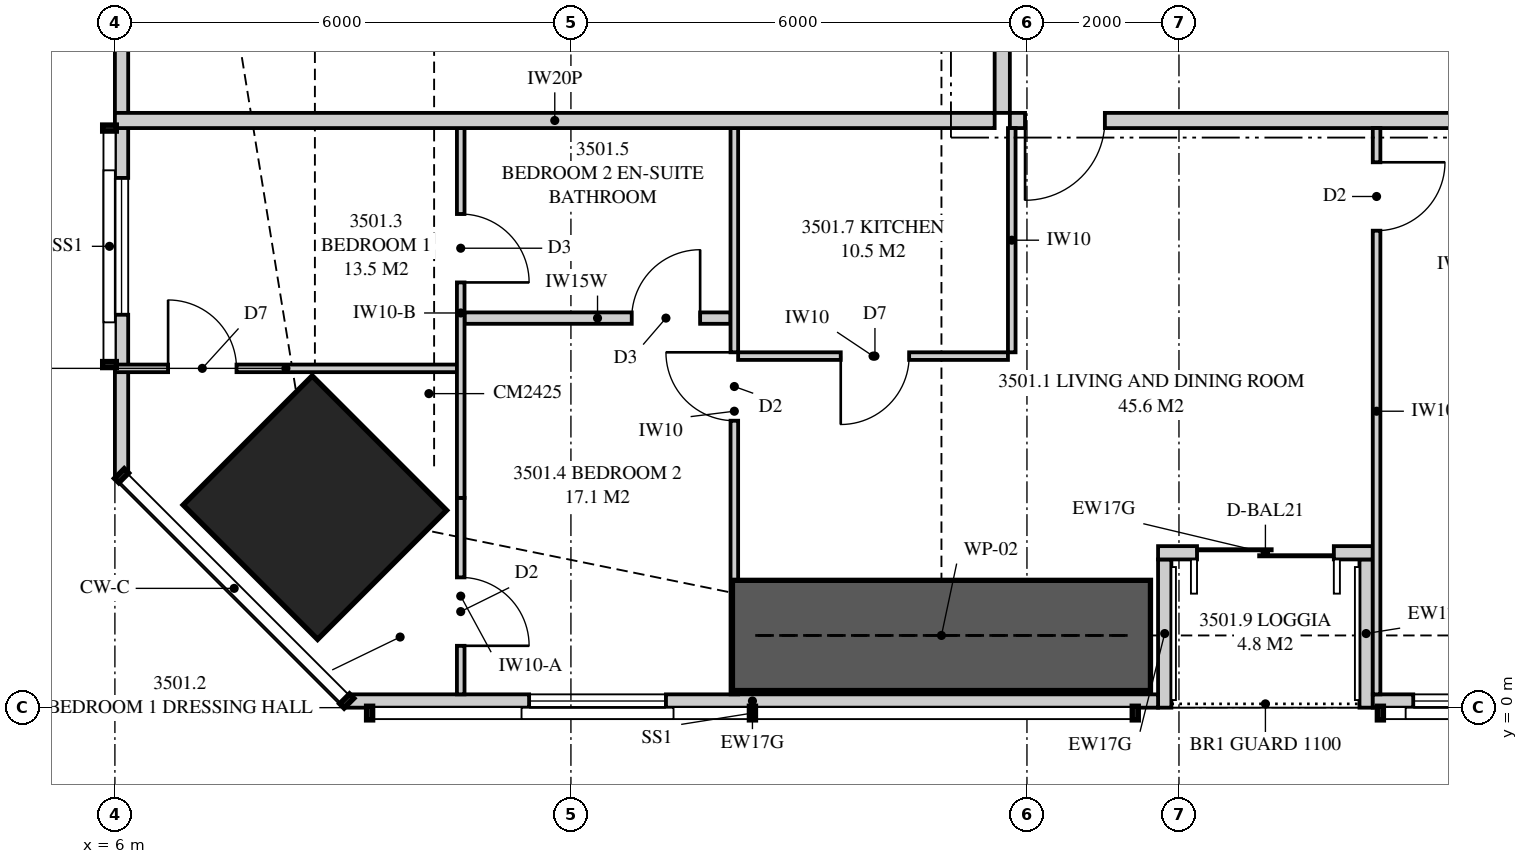
"""IFC4 building model, lengths in metres.
Left out: names, types, materials, properties, quantities, classifications, styles, units other than length and angle.
Written with IfcOpenShell. Run it as: python <this file> out.ifc"""

import sys

from ifc_helpers import new_model, si_unit, direction, frame, frame_2d, origin, origin_2d, place, context, subcontext, project, spatial, polyline, rectangle, outline, extrude, element, fill, save


model = new_model("IFC4")
c1 = context("Model", 3, precision=1e-05, world=origin(), true_north=direction((0.0, 1.0)))
c2 = subcontext(c1, "Body", "Model", "MODEL_VIEW")
j1 = project(units=[si_unit("LENGTHUNIT", "METRE"), si_unit("PLANEANGLEUNIT", "RADIAN")], contexts=[c1])
p1 = place(None, origin())
s1 = spatial("IfcSite", under=j1, at=p1, CompositionType="ELEMENT")
p2 = place(p1, origin())
s2 = spatial("IfcBuilding", under=s1, at=p2, CompositionType="ELEMENT")
p3 = place(p2, frame((0.0, 0.0, 128.3)))
s3 = spatial("IfcBuildingStorey", under=s2, at=p3, CompositionType="ELEMENT", Elevation=128.3)
p4 = place(p3, frame((8.631, 2.631, 0.0), z_axis=(0.0, 0.0, 1.0), x_axis=(0.707106781187, 0.707106781187, 0.0)))
e1 = element("IfcColumn", 1, at=p4, inside=s3, PredefinedType="COLUMN", context=c2, shape_type="SweptSolid", body=[
    extrude(rectangle(XDim=2.4, YDim=2.5, at=origin_2d()), origin(), (0.0, 0.0, 1.0), 3.35),
])
p5 = place(p3, frame((9.051, 0.087, 0.0), z_axis=(0.0, 0.0, 1.0), x_axis=(1.0, 0.0, 0.0)))
e2 = element("IfcWall", 2, at=p5, inside=s3, PredefinedType="SOLIDWALL", context=c2, shape_type="SweptSolid", body=[
    extrude(outline(polyline([(0.0, 0.0), (10.674, 0.0), (10.674, 2.15), (7.824, 2.15), (7.824, 3.11), (7.666, 3.11), (7.666, 2.15), (7.62, 2.15), (7.62, 3.11), (0.0, 3.11), (0.0, 0.0)])), frame((0.0, 0.087, 0.0), z_axis=(0.0, -1.0, 0.0), x_axis=(1.0, 0.0, 0.0)), (0.0, 0.0, 1.0), 0.175),
])
p6 = place(p5, frame((2.399, 0.0, 0.4)))
e3 = element("IfcOpeningElement", 3, at=p6, cuts=e2, PredefinedType="OPENING", context=c2, shape_type="SweptSolid", body=[
    extrude(rectangle(XDim=1.8, YDim=1.7, at=frame_2d((0.9, 0.85))), frame((0.0, 0.097, 0.0), z_axis=(0.0, -1.0, 0.0), x_axis=(1.0, 0.0, 0.0)), (0.0, 0.0, 1.0), 0.195),
])
p7 = place(p3, frame((22.55, 0.087, 0.0), z_axis=(0.0, 0.0, 1.0), x_axis=(1.0, 0.0, 0.0)))
e4 = element("IfcWall", 4, at=p7, inside=s3, PredefinedType="SOLIDWALL", context=c2, shape_type="SweptSolid", body=[
    extrude(rectangle(XDim=10.4, YDim=0.175, at=frame_2d((5.2, 0.0))), origin(), (0.0, 0.0, 1.0), 2.15),
])
p8 = place(p7, frame((0.532, 0.0, 0.4)))
e5 = element("IfcOpeningElement", 5, at=p8, cuts=e4, PredefinedType="OPENING", context=c2, shape_type="SweptSolid", body=[
    extrude(rectangle(XDim=1.8, YDim=1.7, at=frame_2d((0.9, 0.85))), frame((0.0, 0.097, 0.0), z_axis=(0.0, -1.0, 0.0), x_axis=(1.0, 0.0, 0.0)), (0.0, 0.0, 1.0), 0.195),
])
p9 = place(p7, frame((8.065, 0.0, 0.4)))
e6 = element("IfcOpeningElement", 6, at=p9, cuts=e4, PredefinedType="OPENING", context=c2, shape_type="SweptSolid", body=[
    extrude(rectangle(XDim=1.8, YDim=1.7, at=frame_2d((0.9, 0.85))), frame((0.0, 0.097, 0.0), z_axis=(0.0, -1.0, 0.0), x_axis=(1.0, 0.0, 0.0)), (0.0, 0.0, 1.0), 0.195),
])
p10 = place(p3, frame((19.725, 2.038, 0.0), z_axis=(0.0, 0.0, 1.0), x_axis=(1.0, 0.0, 0.0)))
e7 = element("IfcWall", 7, at=p10, inside=s3, PredefinedType="SOLIDWALL", context=c2, shape_type="SweptSolid", body=[
    extrude(rectangle(XDim=2.825, YDim=0.175, at=frame_2d((1.413, 0.0))), origin(), (0.0, 0.0, 1.0), 3.11),
])
p11 = place(p10, frame((0.512, 0.0, 0.0)))
e8 = element("IfcOpeningElement", 8, at=p11, cuts=e7, PredefinedType="OPENING", context=c2, shape_type="SweptSolid", body=[
    extrude(rectangle(XDim=1.8, YDim=2.1, at=frame_2d((0.9, 1.05))), frame((0.0, 0.097, 0.0), z_axis=(0.0, -1.0, 0.0), x_axis=(1.0, 0.0, 0.0)), (0.0, 0.0, 1.0), 0.195),
])
for number, where, z_axis, x_axis in (
    (9, (19.812, 0.0, 0.0), (0.0, 0.0, 1.0), (0.0, 1.0, 0.0)),
    (10, (22.462, 0.0, 0.0), (0.0, 0.0, 1.0), (0.0, 1.0, 0.0)),
):
    element("IfcWall", number, at=place(p3, frame(where, z_axis=z_axis, x_axis=x_axis)), inside=s3, PredefinedType="SOLIDWALL", context=c2, shape_type="SweptSolid", body=[
        extrude(outline(polyline([(0.0, 0.0), (1.95, 0.0), (1.95, 3.11), (1.75, 3.11), (1.75, 2.15), (0.15, 2.15), (0.15, 3.11), (0.0, 3.11), (0.0, 0.0)])), frame((0.0, 0.087, 0.0), z_axis=(0.0, -1.0, 0.0), x_axis=(1.0, 0.0, 0.0)), (0.0, 0.0, 1.0), 0.175),
    ])
p12 = place(p3, frame((6.087, 18.8, 0.0), z_axis=(0.0, 0.0, 1.0), x_axis=(0.0, -1.0, 0.0)))
e11 = element("IfcWall", 11, at=p12, inside=s3, PredefinedType="SOLIDWALL", context=c2, shape_type="SweptSolid", body=[
    extrude(outline(polyline([(0.0, 0.0), (15.749, 0.0), (15.749, 3.11), (6.019, 3.11), (6.019, 2.15), (5.926, 2.15), (5.926, 3.11), (5.8, 3.11), (5.8, 2.15), (0.0, 2.15), (0.0, 0.0)])), frame((0.0, 0.087, 0.0), z_axis=(0.0, -1.0, 0.0), x_axis=(1.0, 0.0, 0.0)), (0.0, 0.0, 1.0), 0.175),
])
p13 = place(p12, frame((0.95, 0.0, 0.4)))
e12 = element("IfcOpeningElement", 12, at=p13, cuts=e11, PredefinedType="OPENING", context=c2, shape_type="SweptSolid", body=[
    extrude(rectangle(XDim=1.8, YDim=1.7, at=frame_2d((0.9, 0.85))), frame((0.0, 0.097, 0.0), z_axis=(0.0, -1.0, 0.0), x_axis=(1.0, 0.0, 0.0)), (0.0, 0.0, 1.0), 0.195),
])
p14 = place(p12, frame((8.76, 0.0, 0.4)))
e13 = element("IfcOpeningElement", 13, at=p14, cuts=e11, PredefinedType="OPENING", context=c2, shape_type="SweptSolid", body=[
    extrude(rectangle(XDim=1.2, YDim=1.7, at=frame_2d((0.6, 0.85))), frame((0.0, 0.097, 0.0), z_axis=(0.0, -1.0, 0.0), x_axis=(1.0, 0.0, 0.0)), (0.0, 0.0, 1.0), 0.195),
])
p15 = place(p12, frame((11.831, 0.0, 0.4)))
e14 = element("IfcOpeningElement", 14, at=p15, cuts=e11, PredefinedType="OPENING", context=c2, shape_type="SweptSolid", body=[
    extrude(rectangle(XDim=1.8, YDim=1.7, at=frame_2d((0.9, 0.85))), frame((0.0, 0.097, 0.0), z_axis=(0.0, -1.0, 0.0), x_axis=(1.0, 0.0, 0.0)), (0.0, 0.0, 1.0), 0.195),
])
p16 = place(p3, frame((17.775, 7.725, 0.0), z_axis=(0.0, 0.0, 1.0), x_axis=(1.0, 0.0, 0.0)))
e15 = element("IfcWall", 15, at=p16, inside=s3, PredefinedType="PARTITIONING", context=c2, shape_type="SweptSolid", body=[
    extrude(rectangle(XDim=9.025, YDim=0.2, at=frame_2d((4.513, 0.0))), origin(), (0.0, 0.0, 1.0), 3.11),
])
p17 = place(p16, frame((0.2, 0.0, 0.0)))
e16 = element("IfcOpeningElement", 16, at=p17, cuts=e15, PredefinedType="OPENING", context=c2, shape_type="SweptSolid", body=[
    extrude(rectangle(XDim=1.05, YDim=2.2, at=frame_2d((0.525, 1.1))), frame((0.0, 0.11, 0.0), z_axis=(0.0, -1.0, 0.0), x_axis=(1.0, 0.0, 0.0)), (0.0, 0.0, 1.0), 0.22),
])
p18 = place(p3, frame((10.55, 0.175, 0.0), z_axis=(0.0, 0.0, 1.0), x_axis=(0.0, 1.0, 0.0)))
e17 = element("IfcWall", 17, at=p18, inside=s3, PredefinedType="PARTITIONING", context=c2, shape_type="SweptSolid", body=[
    extrude(outline(polyline([(0.0, 0.0), (2.585, 0.0), (2.585, 2.15), (1.188, 2.15), (1.188, 3.11), (0.0, 3.11), (0.0, 0.0)])), frame((0.0, 0.05, 0.0), z_axis=(0.0, -1.0, 0.0), x_axis=(1.0, 0.0, 0.0)), (0.0, 0.0, 1.0), 0.1),
])
p19 = place(p18, frame((0.639, 0.0, 0.0)))
e18 = element("IfcOpeningElement", 18, at=p19, cuts=e17, PredefinedType="OPENING", context=c2, shape_type="SweptSolid", body=[
    extrude(rectangle(XDim=0.9, YDim=2.1, at=frame_2d((0.45, 1.05))), frame((0.0, 0.06, 0.0), z_axis=(0.0, -1.0, 0.0), x_axis=(1.0, 0.0, 0.0)), (0.0, 0.0, 1.0), 0.12),
])
p20 = place(p3, frame((10.55, 2.76, 0.0), z_axis=(0.0, 0.0, 1.0), x_axis=(0.0, 1.0, 0.0)))
e19 = element("IfcWall", 19, at=p20, inside=s3, PredefinedType="PARTITIONING", context=c2, shape_type="SweptSolid", body=[
    extrude(outline(polyline([(0.0, 0.0), (4.865, 0.0), (4.865, 2.51), (0.358, 2.51), (0.358, 2.15), (0.0, 2.15), (0.0, 0.0)])), frame((0.0, 0.05, 0.0), z_axis=(0.0, -1.0, 0.0), x_axis=(1.0, 0.0, 0.0)), (0.0, 0.0, 1.0), 0.1),
])
p21 = place(p20, frame((2.834, 0.0, 0.0)))
e20 = element("IfcOpeningElement", 20, at=p21, cuts=e19, PredefinedType="OPENING", context=c2, shape_type="SweptSolid", body=[
    extrude(rectangle(XDim=0.9, YDim=2.1, at=frame_2d((0.45, 1.05))), frame((0.0, 0.06, 0.0), z_axis=(0.0, -1.0, 0.0), x_axis=(1.0, 0.0, 0.0)), (0.0, 0.0, 1.0), 0.12),
])
p22 = place(p3, frame((14.15, 0.175, 0.0), z_axis=(0.0, 0.0, 1.0), x_axis=(0.0, 1.0, 0.0)))
e21 = element("IfcWall", 21, at=p22, inside=s3, PredefinedType="PARTITIONING", context=c2, shape_type="SweptSolid", body=[
    extrude(outline(polyline([(0.0, 0.0), (7.45, 0.0), (7.45, 3.11), (2.208, 3.11), (2.208, 2.15), (0.453, 2.15), (0.453, 3.11), (0.0, 3.11), (0.0, 0.0)])), frame((0.0, 0.05, 0.0), z_axis=(0.0, -1.0, 0.0), x_axis=(1.0, 0.0, 0.0)), (0.0, 0.0, 1.0), 0.1),
])
p23 = place(p22, frame((3.6, 0.0, 0.0)))
e22 = element("IfcOpeningElement", 22, at=p23, cuts=e21, PredefinedType="OPENING", context=c2, shape_type="SweptSolid", body=[
    extrude(rectangle(XDim=0.9, YDim=2.1, at=frame_2d((0.45, 1.05))), frame((0.0, 0.06, 0.0), z_axis=(0.0, -1.0, 0.0), x_axis=(1.0, 0.0, 0.0)), (0.0, 0.0, 1.0), 0.12),
])
p24 = place(p3, frame((6.0, 4.464, 0.0), z_axis=(0.0, 0.0, 1.0), x_axis=(1.0, 0.0, 0.0)))
e23 = element("IfcWall", 23, at=p24, inside=s3, PredefinedType="PARTITIONING", context=c2, shape_type="SweptSolid", body=[
    extrude(outline(polyline([(0.0, 0.0), (4.5, 0.0), (4.5, 3.11), (4.5, 2.51), (3.206, 2.51), (3.206, 2.15), (1.463, 2.15), (1.463, 3.11), (0.0, 3.11), (0.0, 0.0)])), frame((0.0, 0.05, 0.0), z_axis=(0.0, -1.0, 0.0), x_axis=(1.0, 0.0, 0.0)), (0.0, 0.0, 1.0), 0.1),
])
p25 = place(p24, frame((0.7, 0.0, 0.0)))
e24 = element("IfcOpeningElement", 24, at=p25, cuts=e23, PredefinedType="OPENING", context=c2, shape_type="SweptSolid", body=[
    extrude(rectangle(XDim=0.9, YDim=2.1, at=frame_2d((0.45, 1.05))), frame((0.0, 0.06, 0.0), z_axis=(0.0, -1.0, 0.0), x_axis=(1.0, 0.0, 0.0)), (0.0, 0.0, 1.0), 0.12),
])
p26 = place(p3, frame((10.6, 5.125, 0.0), z_axis=(0.0, 0.0, 1.0), x_axis=(1.0, 0.0, 0.0)))
e25 = element("IfcWall", 25, at=p26, inside=s3, PredefinedType="PLUMBINGWALL", context=c2, shape_type="SweptSolid", body=[
    extrude(outline(polyline([(0.0, 0.0), (3.5, 0.0), (3.5, 3.11), (0.885, 3.11), (0.885, 2.51), (0.0, 2.51), (0.0, 3.11), (0.0, 0.0)])), frame((0.0, 0.075, 0.0), z_axis=(0.0, -1.0, 0.0), x_axis=(1.0, 0.0, 0.0)), (0.0, 0.0, 1.0), 0.15),
])
p27 = place(p26, frame((2.2, 0.0, 0.0)))
e26 = element("IfcOpeningElement", 26, at=p27, cuts=e25, PredefinedType="OPENING", context=c2, shape_type="SweptSolid", body=[
    extrude(rectangle(XDim=0.9, YDim=2.1, at=frame_2d((0.45, 1.05))), frame((0.0, 0.085, 0.0), z_axis=(0.0, -1.0, 0.0), x_axis=(1.0, 0.0, 0.0)), (0.0, 0.0, 1.0), 0.17),
])
p28 = place(p3, frame((22.6, 0.175, 0.0), z_axis=(0.0, 0.0, 1.0), x_axis=(0.0, 1.0, 0.0)))
e27 = element("IfcWall", 27, at=p28, inside=s3, PredefinedType="PARTITIONING", context=c2, shape_type="SweptSolid", body=[
    extrude(outline(polyline([(0.0, 0.0), (7.45, 0.0), (7.45, 3.11), (1.635, 3.11), (1.635, 2.15), (0.0, 2.15), (0.0, 3.11), (0.0, 0.0)])), frame((0.0, 0.05, 0.0), z_axis=(0.0, -1.0, 0.0), x_axis=(1.0, 0.0, 0.0)), (0.0, 0.0, 1.0), 0.1),
])
p29 = place(p28, frame((6.1, 0.0, 0.0)))
e28 = element("IfcOpeningElement", 28, at=p29, cuts=e27, PredefinedType="OPENING", context=c2, shape_type="SweptSolid", body=[
    extrude(rectangle(XDim=0.9, YDim=2.1, at=frame_2d((0.45, 1.05))), frame((0.0, 0.06, 0.0), z_axis=(0.0, -1.0, 0.0), x_axis=(1.0, 0.0, 0.0)), (0.0, 0.0, 1.0), 0.12),
])
p30 = place(p3, frame((14.2, 4.625, 0.0), z_axis=(0.0, 0.0, 1.0), x_axis=(1.0, 0.0, 0.0)))
e29 = element("IfcWall", 29, at=p30, inside=s3, PredefinedType="PARTITIONING", context=c2, shape_type="SweptSolid", body=[
    extrude(outline(polyline([(0.0, 0.0), (3.55, 0.0), (3.55, 3.11), (2.962, 3.11), (2.962, 2.541), (2.388, 2.541), (2.388, 3.11), (0.0, 3.11), (0.0, 0.0)])), frame((0.0, 0.05, 0.0), z_axis=(0.0, -1.0, 0.0), x_axis=(1.0, 0.0, 0.0)), (0.0, 0.0, 1.0), 0.1),
])
p31 = place(p30, frame((1.35, 0.0, 0.0)))
e30 = element("IfcOpeningElement", 30, at=p31, cuts=e29, PredefinedType="OPENING", context=c2, shape_type="SweptSolid", body=[
    extrude(rectangle(XDim=0.9, YDim=2.1, at=frame_2d((0.45, 1.05))), frame((0.0, 0.06, 0.0), z_axis=(0.0, -1.0, 0.0), x_axis=(1.0, 0.0, 0.0)), (0.0, 0.0, 1.0), 0.12),
])
p32 = place(p3, frame((17.8, 4.675, 0.0), z_axis=(0.0, 0.0, 1.0), x_axis=(0.0, 1.0, 0.0)))
e31 = element("IfcWall", 31, at=p32, inside=s3, PredefinedType="PARTITIONING", context=c2, shape_type="SweptSolid", body=[
    extrude(rectangle(XDim=2.95, YDim=0.1, at=frame_2d((1.475, 0.0))), origin(), (0.0, 0.0, 1.0), 3.11),
])
p33 = place(p3, frame((6.0, 7.725, 0.0), z_axis=(0.0, 0.0, 1.0), x_axis=(1.0, 0.0, 0.0)))
e32 = element("IfcWall", 32, at=p33, inside=s3, PredefinedType="PARTITIONING", context=c2, shape_type="SweptSolid", body=[
    extrude(outline(polyline([(0.0, 0.0), (11.575, 0.0), (11.575, 3.11), (11.212, 3.11), (11.212, 2.541), (10.538, 2.541), (10.538, 3.11), (5.51, 3.11), (5.51, 2.51), (2.969, 2.51), (2.969, 2.541), (2.727, 2.541), (2.727, 2.15), (0.884, 2.15), (0.884, 3.11), (0.0, 3.11), (0.0, 0.0)])), frame((0.0, 0.1, 0.0), z_axis=(0.0, -1.0, 0.0), x_axis=(1.0, 0.0, 0.0)), (0.0, 0.0, 1.0), 0.2),
])
p34 = place(p3, frame((17.675, 7.825, 0.0), z_axis=(0.0, 0.0, 1.0), x_axis=(0.0, 1.0, 0.0)))
e33 = element("IfcWall", 33, at=p34, inside=s3, PredefinedType="PARTITIONING", context=c2, shape_type="SweptSolid", body=[
    extrude(rectangle(XDim=1.413, YDim=0.2, at=frame_2d((0.706, 0.0))), origin(), (0.0, 0.0, 1.0), 3.11),
])
p35 = place(p3, frame((14.125, 0.95, 0.0), z_axis=(0.0, 0.0, 1.0), x_axis=(1.0, 0.0, 0.0)))
e34 = element("IfcWall", 34, at=p35, inside=s3, PredefinedType="SHEAR", context=c2, shape_type="SweptSolid", body=[
    extrude(rectangle(XDim=5.5, YDim=1.45, at=frame_2d((2.75, 0.0))), origin(), (0.0, 0.0, 1.0), 3.35),
])
p36 = place(p6, origin())
e35 = element("IfcWindow", 35, at=p36, inside=s3, PartitioningType="SINGLE_PANEL", PredefinedType="WINDOW", context=c2, shape_type="SweptSolid", body=[
    extrude(rectangle(XDim=1.8, YDim=1.7, at=frame_2d((0.9, 0.85))), frame((0.0, 0.03, 0.0), z_axis=(0.0, -1.0, 0.0), x_axis=(1.0, 0.0, 0.0)), (0.0, 0.0, 1.0), 0.06),
])
fill(e3, e35)
p37 = place(p11, origin())
e36 = element("IfcDoor", 36, at=p37, inside=s3, OperationType="SLIDING_TO_LEFT", PredefinedType="DOOR", context=c2, shape_type="SweptSolid", body=[
    extrude(rectangle(XDim=1.8, YDim=2.1, at=frame_2d((0.9, 1.05))), frame((0.0, 0.025, 0.0), z_axis=(0.0, -1.0, 0.0), x_axis=(1.0, 0.0, 0.0)), (0.0, 0.0, 1.0), 0.05),
])
fill(e8, e36)
p38 = place(p8, origin())
e37 = element("IfcWindow", 37, at=p38, inside=s3, PartitioningType="SINGLE_PANEL", PredefinedType="WINDOW", context=c2, shape_type="SweptSolid", body=[
    extrude(rectangle(XDim=1.8, YDim=1.7, at=frame_2d((0.9, 0.85))), frame((0.0, 0.03, 0.0), z_axis=(0.0, -1.0, 0.0), x_axis=(1.0, 0.0, 0.0)), (0.0, 0.0, 1.0), 0.06),
])
fill(e5, e37)
p39 = place(p15, origin())
e38 = element("IfcWindow", 38, at=p39, inside=s3, PartitioningType="SINGLE_PANEL", PredefinedType="WINDOW", context=c2, shape_type="SweptSolid", body=[
    extrude(rectangle(XDim=1.8, YDim=1.7, at=frame_2d((0.9, 0.85))), frame((0.0, 0.03, 0.0), z_axis=(0.0, -1.0, 0.0), x_axis=(1.0, 0.0, 0.0)), (0.0, 0.0, 1.0), 0.06),
])
fill(e14, e38)
p40 = place(p17, frame((1.05, 0.0, 0.0), z_axis=(0.0, 0.0, 1.0), x_axis=(-1.0, 0.0, 0.0)))
e39 = element("IfcDoor", 39, at=p40, inside=s3, OperationType="SINGLE_SWING_RIGHT", PredefinedType="DOOR", context=c2, shape_type="SweptSolid", body=[
    extrude(rectangle(XDim=1.05, YDim=2.2, at=frame_2d((0.525, 1.1))), frame((0.0, 0.025, 0.0), z_axis=(0.0, -1.0, 0.0), x_axis=(1.0, 0.0, 0.0)), (0.0, 0.0, 1.0), 0.05),
])
fill(e16, e39)
p41 = place(p25, origin())
e40 = element("IfcDoor", 40, at=p41, inside=s3, OperationType="SINGLE_SWING_LEFT", PredefinedType="DOOR", context=c2, shape_type="SweptSolid", body=[
    extrude(rectangle(XDim=0.9, YDim=2.1, at=frame_2d((0.45, 1.05))), frame((0.0, 0.025, 0.0), z_axis=(0.0, -1.0, 0.0), x_axis=(1.0, 0.0, 0.0)), (0.0, 0.0, 1.0), 0.05),
])
fill(e24, e40)
p42 = place(p19, frame((0.9, 0.0, 0.0), z_axis=(0.0, 0.0, 1.0), x_axis=(-1.0, 0.0, 0.0)))
e41 = element("IfcDoor", 41, at=p42, inside=s3, OperationType="SINGLE_SWING_RIGHT", PredefinedType="DOOR", context=c2, shape_type="SweptSolid", body=[
    extrude(rectangle(XDim=0.9, YDim=2.1, at=frame_2d((0.45, 1.05))), frame((0.0, 0.025, 0.0), z_axis=(0.0, -1.0, 0.0), x_axis=(1.0, 0.0, 0.0)), (0.0, 0.0, 1.0), 0.05),
])
fill(e18, e41)
p43 = place(p23, origin())
e42 = element("IfcDoor", 42, at=p43, inside=s3, OperationType="SINGLE_SWING_RIGHT", PredefinedType="DOOR", context=c2, shape_type="SweptSolid", body=[
    extrude(rectangle(XDim=0.9, YDim=2.1, at=frame_2d((0.45, 1.05))), frame((0.0, 0.025, 0.0), z_axis=(0.0, -1.0, 0.0), x_axis=(1.0, 0.0, 0.0)), (0.0, 0.0, 1.0), 0.05),
])
fill(e22, e42)
p44 = place(p27, origin())
e43 = element("IfcDoor", 43, at=p44, inside=s3, OperationType="SINGLE_SWING_RIGHT", PredefinedType="DOOR", context=c2, shape_type="SweptSolid", body=[
    extrude(rectangle(XDim=0.9, YDim=2.1, at=frame_2d((0.45, 1.05))), frame((0.0, 0.025, 0.0), z_axis=(0.0, -1.0, 0.0), x_axis=(1.0, 0.0, 0.0)), (0.0, 0.0, 1.0), 0.05),
])
fill(e26, e43)
p45 = place(p21, frame((0.9, 0.0, 0.0), z_axis=(0.0, 0.0, 1.0), x_axis=(-1.0, 0.0, 0.0)))
e44 = element("IfcDoor", 44, at=p45, inside=s3, OperationType="SINGLE_SWING_RIGHT", PredefinedType="DOOR", context=c2, shape_type="SweptSolid", body=[
    extrude(rectangle(XDim=0.9, YDim=2.1, at=frame_2d((0.45, 1.05))), frame((0.0, 0.025, 0.0), z_axis=(0.0, -1.0, 0.0), x_axis=(1.0, 0.0, 0.0)), (0.0, 0.0, 1.0), 0.05),
])
fill(e20, e44)
p46 = place(p29, frame((0.9, 0.0, 0.0), z_axis=(0.0, 0.0, 1.0), x_axis=(-1.0, 0.0, 0.0)))
e45 = element("IfcDoor", 45, at=p46, inside=s3, OperationType="SINGLE_SWING_LEFT", PredefinedType="DOOR", context=c2, shape_type="SweptSolid", body=[
    extrude(rectangle(XDim=0.9, YDim=2.1, at=frame_2d((0.45, 1.05))), frame((0.0, 0.025, 0.0), z_axis=(0.0, -1.0, 0.0), x_axis=(1.0, 0.0, 0.0)), (0.0, 0.0, 1.0), 0.05),
])
fill(e28, e45)
p47 = place(p31, frame((0.9, 0.0, 0.0), z_axis=(0.0, 0.0, 1.0), x_axis=(-1.0, 0.0, 0.0)))
e46 = element("IfcDoor", 46, at=p47, inside=s3, OperationType="SINGLE_SWING_RIGHT", PredefinedType="DOOR", context=c2, shape_type="SweptSolid", body=[
    extrude(rectangle(XDim=0.9, YDim=2.1, at=frame_2d((0.45, 1.05))), frame((0.0, 0.025, 0.0), z_axis=(0.0, -1.0, 0.0), x_axis=(1.0, 0.0, 0.0)), (0.0, 0.0, 1.0), 0.05),
])
fill(e30, e46)
save(model, sys.argv[1])
